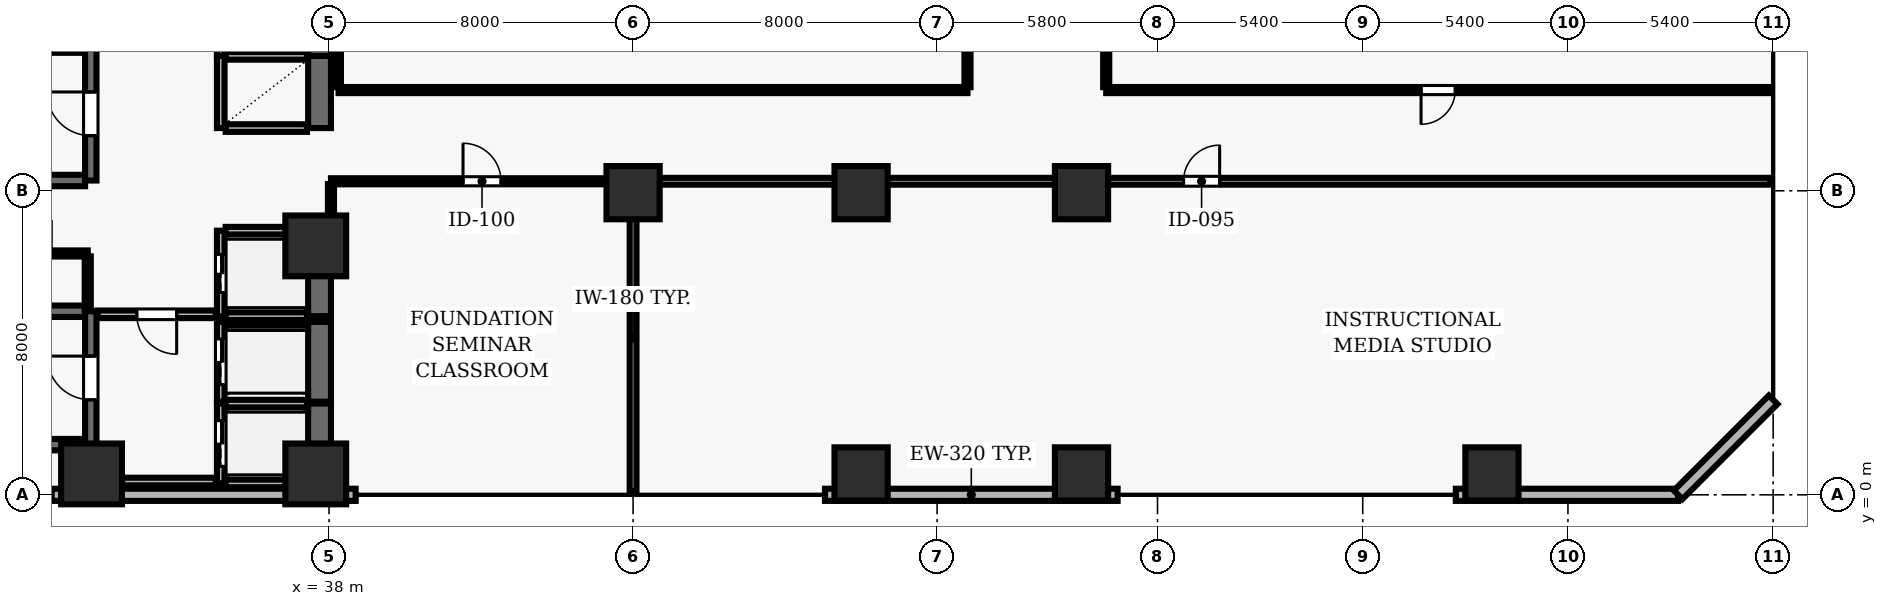
"""IFC4 building model, lengths in metres.
Left out: names, types, materials, properties, quantities, classifications, styles, units other than length and angle.
Written with IfcOpenShell. Run it as: python <this file> out.ifc"""

import sys

from ifc_helpers import new_model, si_unit, direction, frame, frame_2d, origin, origin_2d, place, context, subcontext, project, spatial, rectangle, extrude, element, fill, save


model = new_model("IFC4")
c1 = context("Model", 3, precision=1e-05, world=origin(), true_north=direction((0.0, 1.0)))
c2 = subcontext(c1, "Body", "Model", "MODEL_VIEW")
j1 = project(units=[si_unit("LENGTHUNIT", "METRE"), si_unit("PLANEANGLEUNIT", "RADIAN")], contexts=[c1])
p1 = place(None, origin())
s1 = spatial("IfcSite", under=j1, at=p1, CompositionType="ELEMENT")
p2 = place(p1, origin())
s2 = spatial("IfcBuilding", under=s1, at=p2, CompositionType="ELEMENT")
p3 = place(p2, frame((0.0, 0.0, 15.6)))
s3 = spatial("IfcBuildingStorey", under=s2, at=p3, CompositionType="ELEMENT", Elevation=15.6)
for number, where, z_axis, x_axis in (
    (1, (31.75, 0.55, 0.0), (0.0, 0.0, 1.0), (1.0, 0.0, 0.0)),
    (2, (37.65, 0.55, 0.0), (0.0, 0.0, 1.0), (1.0, 0.0, 0.0)),
    (3, (37.65, 6.55, 0.0), (0.0, 0.0, 1.0), (1.0, 0.0, 0.0)),
):
    element("IfcColumn", number, at=place(p3, frame(where, z_axis=z_axis, x_axis=x_axis)), inside=s3, PredefinedType="COLUMN", context=c2, shape_type="SweptSolid", body=[
        extrude(rectangle(XDim=1.6, YDim=1.6, at=origin_2d()), origin(), (0.0, 0.0, 1.0), 5.2),
    ])
for number, where, z_axis, x_axis in (
    (4, (46.0, 7.95, 0.0), (0.0, 0.0, 1.0), (1.0, 0.0, 0.0)),
    (5, (52.0, 0.55, 0.0), (0.0, 0.0, 1.0), (1.0, 0.0, 0.0)),
    (6, (52.0, 7.95, 0.0), (0.0, 0.0, 1.0), (1.0, 0.0, 0.0)),
    (7, (57.8, 0.55, 0.0), (0.0, 0.0, 1.0), (1.0, 0.0, 0.0)),
    (8, (57.8, 7.95, 0.0), (0.0, 0.0, 1.0), (1.0, 0.0, 0.0)),
    (9, (68.6, 0.55, 0.0), (0.0, 0.0, 1.0), (1.0, 0.0, 0.0)),
):
    element("IfcColumn", number, at=place(p3, frame(where, z_axis=z_axis, x_axis=x_axis)), inside=s3, PredefinedType="COLUMN", context=c2, shape_type="SweptSolid", body=[
        extrude(rectangle(XDim=1.4, YDim=1.4, at=origin_2d()), origin(), (0.0, 0.0, 1.0), 5.2),
    ])
p4 = place(p3, frame((30.7, 0.0, 0.0), z_axis=(0.0, 0.0, 1.0), x_axis=(1.0, 0.0, 0.0)))
e10 = element("IfcWall", 10, at=p4, inside=s3, PredefinedType="SOLIDWALL", context=c2, shape_type="SweptSolid", body=[
    extrude(rectangle(XDim=8.0, YDim=0.32, at=frame_2d((4.0, 0.0))), origin(), (0.0, 0.0, 1.0), 4.92),
])
p5 = place(p3, frame((51.05, 0.0, 0.0), z_axis=(0.0, 0.0, 1.0), x_axis=(1.0, 0.0, 0.0)))
e11 = element("IfcWall", 11, at=p5, inside=s3, PredefinedType="SOLIDWALL", context=c2, shape_type="SweptSolid", body=[
    extrude(rectangle(XDim=7.7, YDim=0.32, at=frame_2d((3.85, 0.0))), origin(), (0.0, 0.0, 1.0), 4.92),
])
p6 = place(p3, frame((67.65, 0.0, 0.0), z_axis=(0.0, 0.0, 1.0), x_axis=(1.0, 0.0, 0.0)))
e12 = element("IfcWall", 12, at=p6, inside=s3, PredefinedType="SOLIDWALL", context=c2, shape_type="SweptSolid", body=[
    extrude(rectangle(XDim=5.85, YDim=0.32, at=frame_2d((2.925, 0.0))), origin(), (0.0, 0.0, 1.0), 4.92),
])
p7 = place(p3, frame((73.5, 0.0, 0.0), z_axis=(0.0, 0.0, 1.0), x_axis=(0.707106781187, 0.707106781187, 0.0)))
e13 = element("IfcWall", 13, at=p7, inside=s3, PredefinedType="SOLIDWALL", context=c2, shape_type="SweptSolid", body=[
    extrude(rectangle(XDim=3.536, YDim=0.32, at=frame_2d((1.768, 0.0))), origin(), (0.0, 0.0, 1.0), 4.92),
])
for number, where, z_axis, x_axis in (
    (14, (31.58, 4.83, 0.0), (0.0, 0.0, 1.0), (-1.0, 0.0, 0.0)),
    (15, (23.22, 1.32, 0.0), (0.0, 0.0, 1.0), (1.0, 0.0, 0.0)),
):
    element("IfcWall", number, at=place(p3, frame(where, z_axis=z_axis, x_axis=x_axis)), inside=s3, PredefinedType="SHEAR", context=c2, shape_type="SweptSolid", body=[
        extrude(rectangle(XDim=8.36, YDim=0.3, at=frame_2d((4.18, 0.0))), origin(), (0.0, 0.0, 1.0), 4.92),
    ])
p8 = place(p3, frame((31.73, 0.96, 0.0), z_axis=(0.0, 0.0, 1.0), x_axis=(0.0, 1.0, 0.0)))
e16 = element("IfcWall", 16, at=p8, inside=s3, PredefinedType="SHEAR", context=c2, shape_type="SweptSolid", body=[
    extrude(rectangle(XDim=3.87, YDim=0.3, at=frame_2d((1.935, 0.0))), origin(), (0.0, 0.0, 1.0), 4.92),
])
p9 = place(p8, frame((1.54, 0.0, 0.0)))
e17 = element("IfcOpeningElement", 17, at=p9, cuts=e16, PredefinedType="OPENING", context=c2, shape_type="SweptSolid", body=[
    extrude(rectangle(XDim=1.15, YDim=2.15, at=frame_2d((0.575, 1.075))), frame((0.0, 0.16, 0.0), z_axis=(0.0, -1.0, 0.0), x_axis=(1.0, 0.0, 0.0)), (0.0, 0.0, 1.0), 0.32),
])
for number, where, z_axis, x_axis in (
    (18, (31.58, 11.78, 0.0), (0.0, 0.0, 1.0), (-1.0, 0.0, 0.0)),
    (19, (23.22, 8.27, 0.0), (0.0, 0.0, 1.0), (1.0, 0.0, 0.0)),
):
    element("IfcWall", number, at=place(p3, frame(where, z_axis=z_axis, x_axis=x_axis)), inside=s3, PredefinedType="SHEAR", context=c2, shape_type="SweptSolid", body=[
        extrude(rectangle(XDim=8.36, YDim=0.3, at=frame_2d((4.18, 0.0))), origin(), (0.0, 0.0, 1.0), 4.92),
    ])
p10 = place(p3, frame((31.73, 8.27, 0.0), z_axis=(0.0, 0.0, 1.0), x_axis=(0.0, 1.0, 0.0)))
e20 = element("IfcWall", 20, at=p10, inside=s3, PredefinedType="SHEAR", context=c2, shape_type="SweptSolid", body=[
    extrude(rectangle(XDim=3.51, YDim=0.3, at=frame_2d((1.755, 0.0))), origin(), (0.0, 0.0, 1.0), 4.92),
])
p11 = place(p10, frame((1.18, 0.0, 0.0)))
e21 = element("IfcOpeningElement", 21, at=p11, cuts=e20, PredefinedType="OPENING", context=c2, shape_type="SweptSolid", body=[
    extrude(rectangle(XDim=1.15, YDim=2.15, at=frame_2d((0.575, 1.075))), frame((0.0, 0.16, 0.0), z_axis=(0.0, -1.0, 0.0), x_axis=(1.0, 0.0, 0.0)), (0.0, 0.0, 1.0), 0.32),
])
p12 = place(p3, frame((35.15, 2.4, 0.0), z_axis=(0.0, 0.0, 1.0), x_axis=(0.0, -1.0, 0.0)))
e22 = element("IfcWall", 22, at=p12, inside=s3, PredefinedType="SOLIDWALL", context=c2, shape_type="SweptSolid", body=[
    extrude(rectangle(XDim=2.1, YDim=0.2, at=frame_2d((1.05, 0.0))), origin(), (0.0, 0.0, 1.0), 4.92),
])
p13 = place(p12, frame((0.45, 0.0, 0.0)))
e23 = element("IfcOpeningElement", 23, at=p13, cuts=e22, PredefinedType="OPENING", context=c2, shape_type="SweptSolid", body=[
    extrude(rectangle(XDim=1.2, YDim=2.15, at=frame_2d((0.6, 1.075))), frame((0.0, 0.11, 0.0), z_axis=(0.0, -1.0, 0.0), x_axis=(1.0, 0.0, 0.0)), (0.0, 0.0, 1.0), 0.22),
])
p14 = place(p3, frame((37.75, 0.3, 0.0), z_axis=(0.0, 0.0, 1.0), x_axis=(0.0, 1.0, 0.0)))
e24 = element("IfcWall", 24, at=p14, inside=s3, PredefinedType="SHEAR", context=c2, shape_type="SweptSolid", body=[
    extrude(rectangle(XDim=2.1, YDim=0.6, at=frame_2d((1.05, 0.0))), origin(), (0.0, 0.0, 1.0), 4.92),
])
for number, where, z_axis, x_axis in (
    (25, (35.28, 0.3, 0.0), (0.0, 0.0, 1.0), (1.0, 0.0, 0.0)),
    (26, (37.42, 2.4, 0.0), (0.0, 0.0, 1.0), (-1.0, 0.0, 0.0)),
):
    element("IfcWall", number, at=place(p3, frame(where, z_axis=z_axis, x_axis=x_axis)), inside=s3, PredefinedType="SOLIDWALL", context=c2, shape_type="SweptSolid", body=[
        extrude(rectangle(XDim=2.14, YDim=0.2, at=frame_2d((1.07, 0.0))), origin(), (0.0, 0.0, 1.0), 4.92),
    ])
p15 = place(p3, frame((35.15, 4.55, 0.0), z_axis=(0.0, 0.0, 1.0), x_axis=(0.0, -1.0, 0.0)))
e27 = element("IfcWall", 27, at=p15, inside=s3, PredefinedType="SOLIDWALL", context=c2, shape_type="SweptSolid", body=[
    extrude(rectangle(XDim=2.1, YDim=0.2, at=frame_2d((1.05, 0.0))), origin(), (0.0, 0.0, 1.0), 4.92),
])
p16 = place(p15, frame((0.45, 0.0, 0.0)))
e28 = element("IfcOpeningElement", 28, at=p16, cuts=e27, PredefinedType="OPENING", context=c2, shape_type="SweptSolid", body=[
    extrude(rectangle(XDim=1.2, YDim=2.15, at=frame_2d((0.6, 1.075))), frame((0.0, 0.11, 0.0), z_axis=(0.0, -1.0, 0.0), x_axis=(1.0, 0.0, 0.0)), (0.0, 0.0, 1.0), 0.22),
])
p17 = place(p3, frame((37.75, 2.45, 0.0), z_axis=(0.0, 0.0, 1.0), x_axis=(0.0, 1.0, 0.0)))
e29 = element("IfcWall", 29, at=p17, inside=s3, PredefinedType="SHEAR", context=c2, shape_type="SweptSolid", body=[
    extrude(rectangle(XDim=2.1, YDim=0.6, at=frame_2d((1.05, 0.0))), origin(), (0.0, 0.0, 1.0), 4.92),
])
p18 = place(p3, frame((37.42, 4.55, 0.0), z_axis=(0.0, 0.0, 1.0), x_axis=(-1.0, 0.0, 0.0)))
e30 = element("IfcWall", 30, at=p18, inside=s3, PredefinedType="SOLIDWALL", context=c2, shape_type="SweptSolid", body=[
    extrude(rectangle(XDim=2.14, YDim=0.2, at=frame_2d((1.07, 0.0))), origin(), (0.0, 0.0, 1.0), 4.92),
])
p19 = place(p3, frame((35.15, 6.95, 0.0), z_axis=(0.0, 0.0, 1.0), x_axis=(0.0, -1.0, 0.0)))
e31 = element("IfcWall", 31, at=p19, inside=s3, PredefinedType="SOLIDWALL", context=c2, shape_type="SweptSolid", body=[
    extrude(rectangle(XDim=2.25, YDim=0.2, at=frame_2d((1.125, 0.0))), origin(), (0.0, 0.0, 1.0), 4.92),
])
p20 = place(p19, frame((0.625, 0.0, 0.0)))
e32 = element("IfcOpeningElement", 32, at=p20, cuts=e31, PredefinedType="OPENING", context=c2, shape_type="SweptSolid", body=[
    extrude(rectangle(XDim=1.0, YDim=2.1, at=frame_2d((0.5, 1.05))), frame((0.0, 0.11, 0.0), z_axis=(0.0, -1.0, 0.0), x_axis=(1.0, 0.0, 0.0)), (0.0, 0.0, 1.0), 0.22),
])
p21 = place(p3, frame((37.75, 4.7, 0.0), z_axis=(0.0, 0.0, 1.0), x_axis=(0.0, 1.0, 0.0)))
e33 = element("IfcWall", 33, at=p21, inside=s3, PredefinedType="SHEAR", context=c2, shape_type="SweptSolid", body=[
    extrude(rectangle(XDim=2.25, YDim=0.6, at=frame_2d((1.125, 0.0))), origin(), (0.0, 0.0, 1.0), 4.92),
])
for number, where, z_axis, x_axis in (
    (34, (35.28, 4.7, 0.0), (0.0, 0.0, 1.0), (1.0, 0.0, 0.0)),
    (35, (37.42, 6.95, 0.0), (0.0, 0.0, 1.0), (-1.0, 0.0, 0.0)),
):
    element("IfcWall", number, at=place(p3, frame(where, z_axis=z_axis, x_axis=x_axis)), inside=s3, PredefinedType="SOLIDWALL", context=c2, shape_type="SweptSolid", body=[
        extrude(rectangle(XDim=2.14, YDim=0.2, at=frame_2d((1.07, 0.0))), origin(), (0.0, 0.0, 1.0), 4.92),
    ])
p22 = place(p3, frame((35.15, 11.55, 0.0), z_axis=(0.0, 0.0, 1.0), x_axis=(0.0, -1.0, 0.0)))
e36 = element("IfcWall", 36, at=p22, inside=s3, PredefinedType="SOLIDWALL", context=c2, shape_type="SweptSolid", body=[
    extrude(rectangle(XDim=1.9, YDim=0.2, at=frame_2d((0.95, 0.0))), origin(), (0.0, 0.0, 1.0), 4.92),
])
p23 = place(p3, frame((37.75, 9.65, 0.0), z_axis=(0.0, 0.0, 1.0), x_axis=(0.0, 1.0, 0.0)))
e37 = element("IfcWall", 37, at=p23, inside=s3, PredefinedType="SHEAR", context=c2, shape_type="SweptSolid", body=[
    extrude(rectangle(XDim=1.9, YDim=0.6, at=frame_2d((0.95, 0.0))), origin(), (0.0, 0.0, 1.0), 4.92),
])
for number, where, z_axis, x_axis in (
    (38, (35.28, 9.65, 0.0), (0.0, 0.0, 1.0), (1.0, 0.0, 0.0)),
    (39, (37.42, 11.55, 0.0), (0.0, 0.0, 1.0), (-1.0, 0.0, 0.0)),
):
    element("IfcWall", number, at=place(p3, frame(where, z_axis=z_axis, x_axis=x_axis)), inside=s3, PredefinedType="SOLIDWALL", context=c2, shape_type="SweptSolid", body=[
        extrude(rectangle(XDim=2.14, YDim=0.2, at=frame_2d((1.07, 0.0))), origin(), (0.0, 0.0, 1.0), 4.92),
    ])
p24 = place(p3, frame((35.15, 13.45, 0.0), z_axis=(0.0, 0.0, 1.0), x_axis=(0.0, -1.0, 0.0)))
e40 = element("IfcWall", 40, at=p24, inside=s3, PredefinedType="SOLIDWALL", context=c2, shape_type="SweptSolid", body=[
    extrude(rectangle(XDim=1.9, YDim=0.2, at=frame_2d((0.95, 0.0))), origin(), (0.0, 0.0, 1.0), 4.92),
])
p25 = place(p3, frame((37.75, 11.55, 0.0), z_axis=(0.0, 0.0, 1.0), x_axis=(0.0, 1.0, 0.0)))
e41 = element("IfcWall", 41, at=p25, inside=s3, PredefinedType="SHEAR", context=c2, shape_type="SweptSolid", body=[
    extrude(rectangle(XDim=2.35, YDim=0.6, at=frame_2d((1.175, 0.0))), origin(), (0.0, 0.0, 1.0), 4.92),
])
p26 = place(p3, frame((28.85, 6.35, 0.0), z_axis=(0.0, 0.0, 1.0), x_axis=(1.0, 0.0, 0.0)))
e42 = element("IfcWall", 42, at=p26, inside=s3, PredefinedType="PARTITIONING", context=c2, shape_type="SweptSolid", body=[
    extrude(rectangle(XDim=2.8, YDim=0.16, at=frame_2d((1.4, 0.0))), origin(), (0.0, 0.0, 1.0), 4.92),
])
p27 = place(p26, frame((0.96, 0.0, 0.0)))
e43 = element("IfcOpeningElement", 43, at=p27, cuts=e42, PredefinedType="OPENING", context=c2, shape_type="SweptSolid", body=[
    extrude(rectangle(XDim=0.88, YDim=2.1, at=frame_2d((0.44, 1.05))), frame((0.0, 0.09, 0.0), z_axis=(0.0, -1.0, 0.0), x_axis=(1.0, 0.0, 0.0)), (0.0, 0.0, 1.0), 0.18),
])
p28 = place(p3, frame((31.65, 0.35, 0.0), z_axis=(0.0, 0.0, 1.0), x_axis=(1.0, 0.0, 0.0)))
e44 = element("IfcWall", 44, at=p28, inside=s3, PredefinedType="SOLIDWALL", context=c2, shape_type="SweptSolid", body=[
    extrude(rectangle(XDim=3.37, YDim=0.2, at=frame_2d((1.685, 0.0))), origin(), (0.0, 0.0, 1.0), 4.92),
])
p29 = place(p3, frame((35.02, 4.75, 0.0), z_axis=(0.0, 0.0, 1.0), x_axis=(-1.0, 0.0, 0.0)))
e45 = element("IfcWall", 45, at=p29, inside=s3, PredefinedType="SOLIDWALL", context=c2, shape_type="SweptSolid", body=[
    extrude(rectangle(XDim=3.11, YDim=0.2, at=frame_2d((1.555, 0.0))), origin(), (0.0, 0.0, 1.0), 4.92),
])
p30 = place(p29, frame((1.03, 0.0, 0.0)))
e46 = element("IfcOpeningElement", 46, at=p30, cuts=e45, PredefinedType="OPENING", context=c2, shape_type="SweptSolid", body=[
    extrude(rectangle(XDim=1.05, YDim=2.15, at=frame_2d((0.525, 1.075))), frame((0.0, 0.11, 0.0), z_axis=(0.0, -1.0, 0.0), x_axis=(1.0, 0.0, 0.0)), (0.0, 0.0, 1.0), 0.22),
])
p31 = place(p3, frame((38.05, 8.25, 0.0), z_axis=(0.0, 0.0, 1.0), x_axis=(1.0, 0.0, 0.0)))
e47 = element("IfcWall", 47, at=p31, inside=s3, PredefinedType="PARTITIONING", context=c2, shape_type="SweptSolid", body=[
    extrude(rectangle(XDim=7.95, YDim=0.16, at=frame_2d((3.975, 0.0))), origin(), (0.0, 0.0, 1.0), 4.065),
])
p32 = place(p31, frame((3.475, 0.0, 0.0)))
e48 = element("IfcOpeningElement", 48, at=p32, cuts=e47, PredefinedType="OPENING", context=c2, shape_type="SweptSolid", body=[
    extrude(rectangle(XDim=1.0, YDim=2.1, at=frame_2d((0.5, 1.05))), frame((0.0, 0.09, 0.0), z_axis=(0.0, -1.0, 0.0), x_axis=(1.0, 0.0, 0.0)), (0.0, 0.0, 1.0), 0.18),
])
p33 = place(p3, frame((46.0, 8.25, 0.0), z_axis=(0.0, 0.0, 1.0), x_axis=(1.0, 0.0, 0.0)))
e49 = element("IfcWall", 49, at=p33, inside=s3, PredefinedType="PARTITIONING", context=c2, shape_type="SweptSolid", body=[
    extrude(rectangle(XDim=29.92, YDim=0.18, at=frame_2d((14.96, 0.0))), origin(), (0.0, 0.0, 1.0), 4.065),
])
p34 = place(p33, frame((14.485, 0.0, 0.0)))
e50 = element("IfcOpeningElement", 50, at=p34, cuts=e49, PredefinedType="OPENING", context=c2, shape_type="SweptSolid", body=[
    extrude(rectangle(XDim=0.95, YDim=2.1, at=frame_2d((0.475, 1.05))), frame((0.0, 0.1, 0.0), z_axis=(0.0, -1.0, 0.0), x_axis=(1.0, 0.0, 0.0)), (0.0, 0.0, 1.0), 0.2),
])
p35 = place(p3, frame((54.8, 10.65, 0.0), z_axis=(0.0, 0.0, 1.0), x_axis=(-1.0, 0.0, 0.0)))
e51 = element("IfcWall", 51, at=p35, inside=s3, PredefinedType="PARTITIONING", context=c2, shape_type="SweptSolid", body=[
    extrude(rectangle(XDim=16.55, YDim=0.16, at=frame_2d((8.275, 0.0))), origin(), (0.0, 0.0, 1.0), 4.451),
])
p36 = place(p3, frame((75.92, 10.65, 0.0), z_axis=(0.0, 0.0, 1.0), x_axis=(-1.0, 0.0, 0.0)))
e52 = element("IfcWall", 52, at=p36, inside=s3, PredefinedType="PARTITIONING", context=c2, shape_type="SweptSolid", body=[
    extrude(rectangle(XDim=17.47, YDim=0.16, at=frame_2d((8.735, 0.0))), origin(), (0.0, 0.0, 1.0), 4.451),
])
p37 = place(p36, frame((8.285, 0.0, 0.0)))
e53 = element("IfcOpeningElement", 53, at=p37, cuts=e52, PredefinedType="OPENING", context=c2, shape_type="SweptSolid", body=[
    extrude(rectangle(XDim=0.9, YDim=2.1, at=frame_2d((0.45, 1.05))), frame((0.0, 0.09, 0.0), z_axis=(0.0, -1.0, 0.0), x_axis=(1.0, 0.0, 0.0)), (0.0, 0.0, 1.0), 0.18),
])
p38 = place(p3, frame((31.65, 4.86, 0.0), z_axis=(0.0, 0.0, 1.0), x_axis=(0.0, 1.0, 0.0)))
e54 = element("IfcWall", 54, at=p38, inside=s3, PredefinedType="PARTITIONING", context=c2, shape_type="SweptSolid", body=[
    extrude(rectangle(XDim=1.415, YDim=0.16, at=frame_2d((0.708, 0.0))), origin(), (0.0, 0.0, 1.0), 4.92),
])
p39 = place(p3, frame((38.05, 7.05, 0.0), z_axis=(0.0, 0.0, 1.0), x_axis=(0.0, 1.0, 0.0)))
e55 = element("IfcWall", 55, at=p39, inside=s3, PredefinedType="PARTITIONING", context=c2, shape_type="SweptSolid", body=[
    extrude(rectangle(XDim=1.125, YDim=0.16, at=frame_2d((0.562, 0.0))), origin(), (0.0, 0.0, 1.0), 4.065),
])
p40 = place(p3, frame((38.25, 25.925, 0.0), z_axis=(0.0, 0.0, 1.0), x_axis=(0.0, -1.0, 0.0)))
e56 = element("IfcWall", 56, at=p40, inside=s3, PredefinedType="PARTITIONING", context=c2, shape_type="SweptSolid", body=[
    extrude(rectangle(XDim=15.2, YDim=0.125, at=frame_2d((7.6, 0.0))), origin(), (0.0, 0.0, 1.0), 4.92),
])
p41 = place(p3, frame((46.0, 0.09, 0.0), z_axis=(0.0, 0.0, 1.0), x_axis=(0.0, 1.0, 0.0)))
e57 = element("IfcWall", 57, at=p41, inside=s3, PredefinedType="PARTITIONING", context=c2, shape_type="SweptSolid", body=[
    extrude(rectangle(XDim=8.075, YDim=0.18, at=frame_2d((4.038, 0.0))), origin(), (0.0, 0.0, 1.0), 4.92),
])
p42 = place(p3, frame((54.8, 27.925, 0.0), z_axis=(0.0, 0.0, 1.0), x_axis=(0.0, -1.0, 0.0)))
e58 = element("IfcWall", 58, at=p42, inside=s3, PredefinedType="PARTITIONING", context=c2, shape_type="SweptSolid", body=[
    extrude(rectangle(XDim=17.2, YDim=0.16, at=frame_2d((8.6, 0.0))), origin(), (0.0, 0.0, 1.0), 4.451),
])
p43 = place(p42, frame((8.15, 0.0, 0.0)))
e59 = element("IfcOpeningElement", 59, at=p43, cuts=e58, PredefinedType="OPENING", context=c2, shape_type="SweptSolid", body=[
    extrude(rectangle(XDim=0.9, YDim=2.1, at=frame_2d((0.45, 1.05))), frame((0.0, 0.09, 0.0), z_axis=(0.0, -1.0, 0.0), x_axis=(1.0, 0.0, 0.0)), (0.0, 0.0, 1.0), 0.18),
])
p44 = place(p3, frame((58.45, 10.725, 0.0), z_axis=(0.0, 0.0, 1.0), x_axis=(0.0, 1.0, 0.0)))
e60 = element("IfcWall", 60, at=p44, inside=s3, PredefinedType="PARTITIONING", context=c2, shape_type="SweptSolid", body=[
    extrude(rectangle(XDim=13.675, YDim=0.16, at=frame_2d((6.837, 0.0))), origin(), (0.0, 0.0, 1.0), 4.92),
])
p45 = place(p9, origin())
e61 = element("IfcDoor", 61, at=p45, inside=s3, OperationType="SINGLE_SWING_RIGHT", PredefinedType="DOOR", context=c2, shape_type="SweptSolid", body=[
    extrude(rectangle(XDim=1.15, YDim=2.15, at=frame_2d((0.575, 1.075))), frame((0.0, 0.025, 0.0), z_axis=(0.0, -1.0, 0.0), x_axis=(1.0, 0.0, 0.0)), (0.0, 0.0, 1.0), 0.05),
])
fill(e17, e61)
p46 = place(p11, origin())
e62 = element("IfcDoor", 62, at=p46, inside=s3, OperationType="SINGLE_SWING_RIGHT", PredefinedType="DOOR", context=c2, shape_type="SweptSolid", body=[
    extrude(rectangle(XDim=1.15, YDim=2.15, at=frame_2d((0.575, 1.075))), frame((0.0, 0.025, 0.0), z_axis=(0.0, -1.0, 0.0), x_axis=(1.0, 0.0, 0.0)), (0.0, 0.0, 1.0), 0.05),
])
fill(e21, e62)
p47 = place(p13, origin())
e63 = element("IfcDoor", 63, at=p47, inside=s3, OperationType="DOUBLE_DOOR_SLIDING", PredefinedType="DOOR", context=c2, shape_type="SweptSolid", body=[
    extrude(rectangle(XDim=1.2, YDim=2.15, at=frame_2d((0.6, 1.075))), frame((0.0, 0.025, 0.0), z_axis=(0.0, -1.0, 0.0), x_axis=(1.0, 0.0, 0.0)), (0.0, 0.0, 1.0), 0.05),
])
fill(e23, e63)
p48 = place(p16, origin())
e64 = element("IfcDoor", 64, at=p48, inside=s3, OperationType="DOUBLE_DOOR_SLIDING", PredefinedType="DOOR", context=c2, shape_type="SweptSolid", body=[
    extrude(rectangle(XDim=1.2, YDim=2.15, at=frame_2d((0.6, 1.075))), frame((0.0, 0.025, 0.0), z_axis=(0.0, -1.0, 0.0), x_axis=(1.0, 0.0, 0.0)), (0.0, 0.0, 1.0), 0.05),
])
fill(e28, e64)
p49 = place(p20, origin())
e65 = element("IfcDoor", 65, at=p49, inside=s3, OperationType="DOUBLE_DOOR_SLIDING", PredefinedType="DOOR", context=c2, shape_type="SweptSolid", body=[
    extrude(rectangle(XDim=1.0, YDim=2.1, at=frame_2d((0.5, 1.05))), frame((0.0, 0.025, 0.0), z_axis=(0.0, -1.0, 0.0), x_axis=(1.0, 0.0, 0.0)), (0.0, 0.0, 1.0), 0.05),
])
fill(e32, e65)
p50 = place(p30, origin())
e66 = element("IfcDoor", 66, at=p50, inside=s3, OperationType="SINGLE_SWING_LEFT", PredefinedType="DOOR", context=c2, shape_type="SweptSolid", body=[
    extrude(rectangle(XDim=1.05, YDim=2.15, at=frame_2d((0.525, 1.075))), frame((0.0, 0.025, 0.0), z_axis=(0.0, -1.0, 0.0), x_axis=(1.0, 0.0, 0.0)), (0.0, 0.0, 1.0), 0.05),
])
fill(e46, e66)
p51 = place(p37, origin())
e67 = element("IfcDoor", 67, at=p51, inside=s3, OperationType="SINGLE_SWING_RIGHT", PredefinedType="DOOR", context=c2, shape_type="SweptSolid", body=[
    extrude(rectangle(XDim=0.9, YDim=2.1, at=frame_2d((0.45, 1.05))), frame((0.0, 0.025, 0.0), z_axis=(0.0, -1.0, 0.0), x_axis=(1.0, 0.0, 0.0)), (0.0, 0.0, 1.0), 0.05),
])
fill(e53, e67)
p52 = place(p32, origin())
e68 = element("IfcDoor", 68, at=p52, inside=s3, OperationType="SINGLE_SWING_LEFT", PredefinedType="DOOR", context=c2, shape_type="SweptSolid", body=[
    extrude(rectangle(XDim=1.0, YDim=2.1, at=frame_2d((0.5, 1.05))), frame((0.0, 0.025, 0.0), z_axis=(0.0, -1.0, 0.0), x_axis=(1.0, 0.0, 0.0)), (0.0, 0.0, 1.0), 0.05),
])
fill(e48, e68)
p53 = place(p34, origin())
e69 = element("IfcDoor", 69, at=p53, inside=s3, OperationType="SINGLE_SWING_RIGHT", PredefinedType="DOOR", context=c2, shape_type="SweptSolid", body=[
    extrude(rectangle(XDim=0.95, YDim=2.1, at=frame_2d((0.475, 1.05))), frame((0.0, 0.025, 0.0), z_axis=(0.0, -1.0, 0.0), x_axis=(1.0, 0.0, 0.0)), (0.0, 0.0, 1.0), 0.05),
])
fill(e50, e69)
save(model, sys.argv[1])
